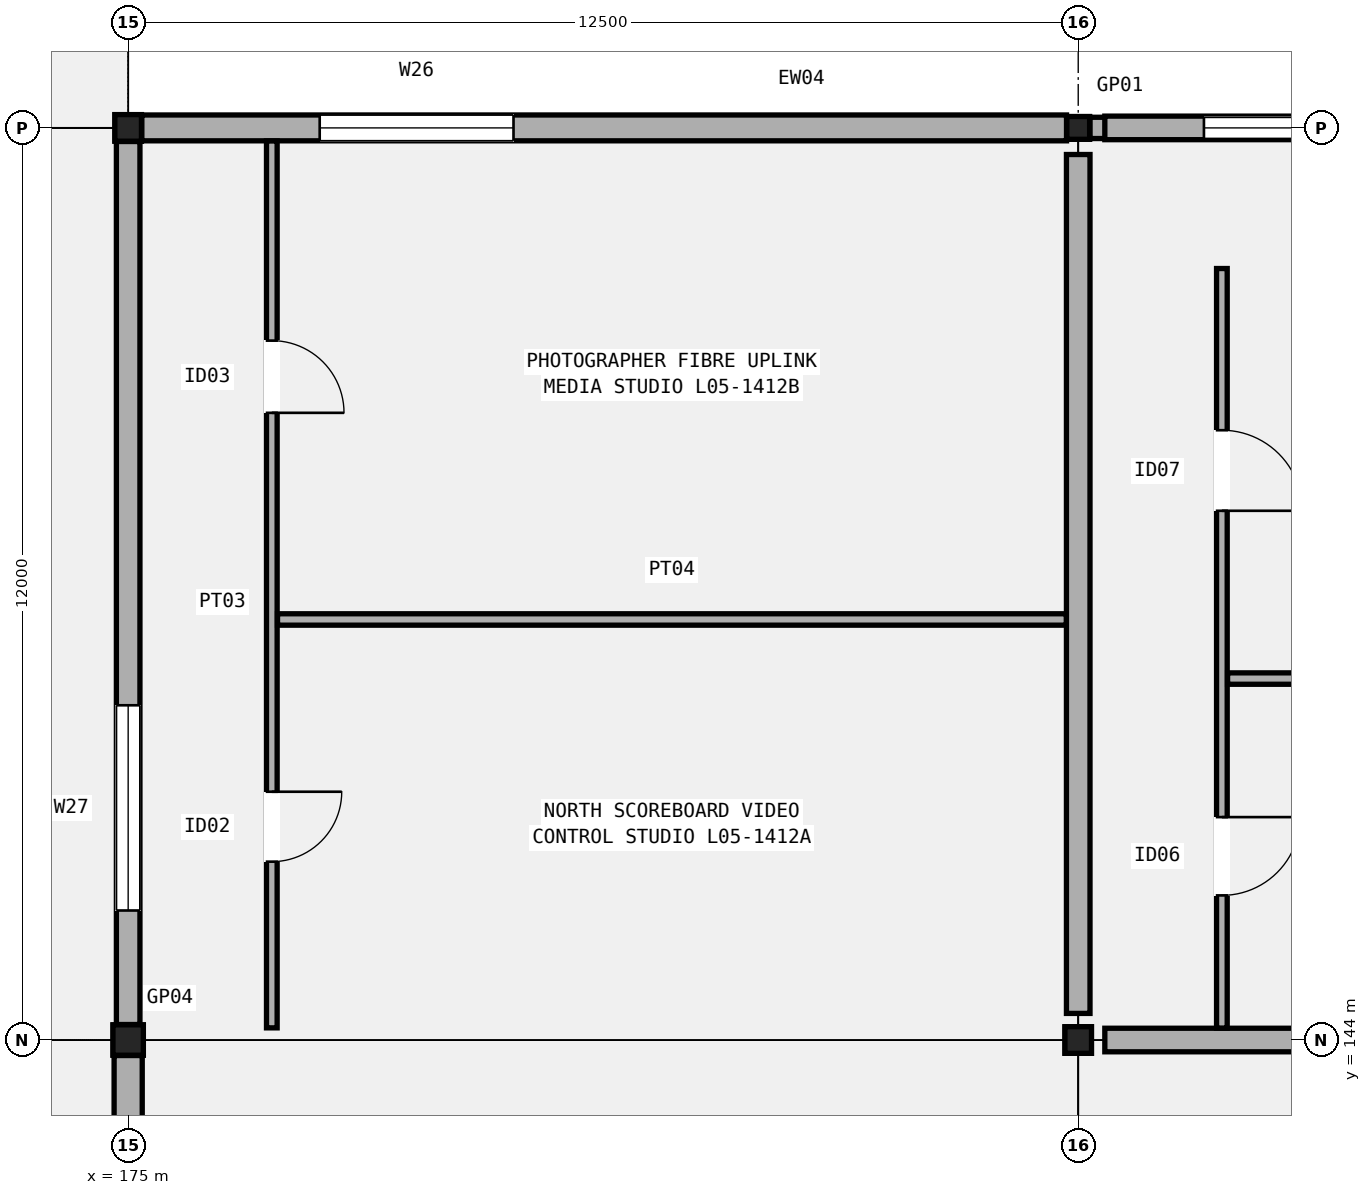
"""IFC4 building model, lengths in metres.
Left out: names, types, materials, properties, quantities, classifications, styles, units other than length and angle.
Written with IfcOpenShell. Run it as: python <this file> out.ifc"""

import sys

from ifc_helpers import new_model, si_unit, direction, frame, frame_2d, origin, origin_2d, place, context, subcontext, project, spatial, rectangle, hollow_rectangle, extrude, element, fill, save


model = new_model("IFC4")
c1 = context("Model", 3, precision=1e-05, world=origin(), true_north=direction((0.0, 1.0)))
c2 = subcontext(c1, "Body", "Model", "MODEL_VIEW")
j1 = project(units=[si_unit("LENGTHUNIT", "METRE"), si_unit("PLANEANGLEUNIT", "RADIAN")], contexts=[c1])
p1 = place(None, origin())
s1 = spatial("IfcSite", under=j1, at=p1, CompositionType="ELEMENT")
p2 = place(p1, origin())
s2 = spatial("IfcBuilding", under=s1, at=p2, CompositionType="ELEMENT")
p3 = place(p2, frame((0.0, 0.0, 25.8)))
s3 = spatial("IfcBuildingStorey", under=s2, at=p3, CompositionType="ELEMENT", Elevation=25.8)
p4 = place(p3, frame((175.0, 144.0, 0.0), z_axis=(0.0, 0.0, 1.0), x_axis=(1.0, 0.0, 0.0)))
e1 = element("IfcColumn", 1, at=p4, inside=s3, PredefinedType="COLUMN", context=c2, shape_type="SweptSolid", body=[
    extrude(hollow_rectangle(XDim=0.4, YDim=0.4, WallThickness=0.016, InnerFilletRadius=0.016, OuterFilletRadius=0.032, at=origin_2d()), origin(), (0.0, 0.0, 1.0), 5.4),
])
for number, where, z_axis, x_axis in (
    (2, (175.0, 156.0, 0.0), (0.0, 0.0, 1.0), (1.0, 0.0, 0.0)),
    (3, (187.5, 144.0, 0.0), (0.0, 0.0, 1.0), (1.0, 0.0, 0.0)),
):
    element("IfcColumn", number, at=place(p3, frame(where, z_axis=z_axis, x_axis=x_axis)), inside=s3, PredefinedType="COLUMN", context=c2, shape_type="SweptSolid", body=[
        extrude(hollow_rectangle(XDim=0.35, YDim=0.35, WallThickness=0.016, InnerFilletRadius=0.016, OuterFilletRadius=0.032, at=origin_2d()), origin(), (0.0, 0.0, 1.0), 5.4),
    ])
p5 = place(p3, frame((187.5, 156.0, 0.0), z_axis=(0.0, 0.0, 1.0), x_axis=(1.0, 0.0, 0.0)))
e4 = element("IfcColumn", 4, at=p5, inside=s3, PredefinedType="COLUMN", context=c2, shape_type="SweptSolid", body=[
    extrude(hollow_rectangle(XDim=0.3, YDim=0.3, WallThickness=0.012, InnerFilletRadius=0.012, OuterFilletRadius=0.024, at=origin_2d()), origin(), (0.0, 0.0, 1.0), 5.4),
])
p6 = place(p3, frame((175.0, 132.304, 0.0), z_axis=(0.0, 0.0, 1.0), x_axis=(0.0, 1.0, 0.0)))
e5 = element("IfcWall", 5, at=p6, inside=s3, PredefinedType="SOLIDWALL", context=c2, shape_type="SweptSolid", body=[
    extrude(rectangle(XDim=11.492, YDim=0.37, at=frame_2d((5.746, 0.0))), origin(), (0.0, 0.0, 1.0), 4.13),
])
p7 = place(p6, frame((1.5, 0.0, 0.95)))
e6 = element("IfcOpeningElement", 6, at=p7, cuts=e5, PredefinedType="OPENING", context=c2, shape_type="SweptSolid", body=[
    extrude(rectangle(XDim=2.4, YDim=2.45, at=frame_2d((1.2, 1.225))), frame((0.0, 0.195, 0.0), z_axis=(0.0, -1.0, 0.0), x_axis=(1.0, 0.0, 0.0)), (0.0, 0.0, 1.0), 0.39),
])
p8 = place(p3, frame((175.179, 156.0, 0.0), z_axis=(0.0, 0.0, 1.0), x_axis=(1.0, 0.0, 0.0)))
e7 = element("IfcWall", 7, at=p8, inside=s3, PredefinedType="SOLIDWALL", context=c2, shape_type="SweptSolid", body=[
    extrude(rectangle(XDim=12.167, YDim=0.34, at=frame_2d((6.083, 0.0))), origin(), (0.0, 0.0, 1.0), 4.34),
])
p9 = place(p8, frame((2.341, 0.0, 0.95)))
e8 = element("IfcOpeningElement", 8, at=p9, cuts=e7, PredefinedType="OPENING", context=c2, shape_type="SweptSolid", body=[
    extrude(rectangle(XDim=2.55, YDim=1.95, at=frame_2d((1.275, 0.975))), frame((0.0, 0.18, 0.0), z_axis=(0.0, -1.0, 0.0), x_axis=(1.0, 0.0, 0.0)), (0.0, 0.0, 1.0), 0.36),
])
p10 = place(p3, frame((175.0, 144.204, 0.0), z_axis=(0.0, 0.0, 1.0), x_axis=(0.0, 1.0, 0.0)))
e9 = element("IfcWall", 9, at=p10, inside=s3, PredefinedType="SOLIDWALL", context=c2, shape_type="SweptSolid", body=[
    extrude(rectangle(XDim=11.617, YDim=0.31, at=frame_2d((5.809, 0.0))), origin(), (0.0, 0.0, 1.0), 4.452),
])
p11 = place(p10, frame((1.5, 0.0, 0.95)))
e10 = element("IfcOpeningElement", 10, at=p11, cuts=e9, PredefinedType="OPENING", context=c2, shape_type="SweptSolid", body=[
    extrude(rectangle(XDim=2.7, YDim=1.75, at=frame_2d((1.35, 0.875))), frame((0.0, 0.165, 0.0), z_axis=(0.0, -1.0, 0.0), x_axis=(1.0, 0.0, 0.0)), (0.0, 0.0, 1.0), 0.33),
])
p12 = place(p3, frame((187.654, 156.0, 0.0), z_axis=(0.0, 0.0, 1.0), x_axis=(1.0, 0.0, 0.0)))
e11 = element("IfcWall", 11, at=p12, inside=s3, PredefinedType="SOLIDWALL", context=c2, shape_type="SweptSolid", body=[
    extrude(rectangle(XDim=12.217, YDim=0.28, at=frame_2d((6.108, 0.0))), origin(), (0.0, 0.0, 1.0), 4.44),
])
p13 = place(p12, frame((1.5, 0.0, 0.95)))
e12 = element("IfcOpeningElement", 12, at=p13, cuts=e11, PredefinedType="OPENING", context=c2, shape_type="SweptSolid", body=[
    extrude(rectangle(XDim=3.3, YDim=2.25, at=frame_2d((1.65, 1.125))), frame((0.0, 0.15, 0.0), z_axis=(0.0, -1.0, 0.0), x_axis=(1.0, 0.0, 0.0)), (0.0, 0.0, 1.0), 0.3),
])
p14 = place(p3, frame((187.85, 144.0, 5.4), z_axis=(0.0, 0.0, 1.0), x_axis=(1.0, 0.0, 0.0)))
e13 = element("IfcWall", 13, at=p14, inside=s3, PredefinedType="SOLIDWALL", context=c2, shape_type="SweptSolid", body=[
    extrude(rectangle(XDim=11.8, YDim=0.31, at=frame_2d((5.9, 0.0))), origin(), (0.0, 0.0, 1.0), 0.58),
])
p15 = place(p3, frame((187.85, 156.0, 5.4), z_axis=(0.0, 0.0, 1.0), x_axis=(1.0, 0.0, 0.0)))
e14 = element("IfcWall", 14, at=p15, inside=s3, PredefinedType="SOLIDWALL", context=c2, shape_type="SweptSolid", body=[
    extrude(rectangle(XDim=11.8, YDim=0.31, at=frame_2d((5.9, 0.0))), origin(), (0.0, 0.0, 1.0), 1.38),
])
p16 = place(p3, frame((187.5, 144.35, 5.4), z_axis=(0.0, 0.0, 1.0), x_axis=(0.0, 1.0, 0.0)))
e15 = element("IfcWall", 15, at=p16, inside=s3, PredefinedType="SOLIDWALL", context=c2, shape_type="SweptSolid", body=[
    extrude(rectangle(XDim=11.3, YDim=0.31, at=frame_2d((5.65, 0.0))), origin(), (0.0, 0.0, 1.0), 0.58),
])
p17 = place(p3, frame((176.89, 144.16, 0.0), z_axis=(0.0, 0.0, 1.0), x_axis=(0.0, 1.0, 0.0)))
e16 = element("IfcWall", 16, at=p17, inside=s3, PredefinedType="PARTITIONING", context=c2, shape_type="SweptSolid", body=[
    extrude(rectangle(XDim=11.668, YDim=0.14, at=frame_2d((5.834, 0.0))), origin(), (0.0, 0.0, 1.0), 4.35),
])
p18 = place(p17, frame((3.106, 0.0, 0.0), z_axis=(0.0, 0.0, 1.0), x_axis=(-1.0, 0.0, 0.0)))
e17 = element("IfcOpeningElement", 17, at=p18, cuts=e16, PredefinedType="OPENING", context=c2, shape_type="SweptSolid", body=[
    extrude(rectangle(XDim=0.92, YDim=2.1, at=frame_2d((0.46, 1.05))), frame((0.0, 0.08, 0.0), z_axis=(0.0, -1.0, 0.0), x_axis=(1.0, 0.0, 0.0)), (0.0, 0.0, 1.0), 0.16),
])
p19 = place(p17, frame((9.041, 0.0, 0.0), z_axis=(0.0, 0.0, 1.0), x_axis=(-1.0, 0.0, 0.0)))
e18 = element("IfcOpeningElement", 18, at=p19, cuts=e16, PredefinedType="OPENING", context=c2, shape_type="SweptSolid", body=[
    extrude(rectangle(XDim=0.95, YDim=2.12, at=frame_2d((0.475, 1.06))), frame((0.0, 0.08, 0.0), z_axis=(0.0, -1.0, 0.0), x_axis=(1.0, 0.0, 0.0)), (0.0, 0.0, 1.0), 0.16),
])
p20 = place(p3, frame((176.965, 149.533, 0.0), z_axis=(0.0, 0.0, 1.0), x_axis=(1.0, 0.0, 0.0)))
e19 = element("IfcWall", 19, at=p20, inside=s3, PredefinedType="PARTITIONING", context=c2, shape_type="SweptSolid", body=[
    extrude(rectangle(XDim=10.378, YDim=0.15, at=frame_2d((5.189, 0.0))), origin(), (0.0, 0.0, 1.0), 4.35),
])
p21 = place(p3, frame((189.39, 144.157, 0.0), z_axis=(0.0, 0.0, 1.0), x_axis=(0.0, 1.0, 0.0)))
e20 = element("IfcWall", 20, at=p21, inside=s3, PredefinedType="PARTITIONING", context=c2, shape_type="SweptSolid", body=[
    extrude(rectangle(XDim=9.993, YDim=0.14, at=frame_2d((4.997, 0.0))), origin(), (0.0, 0.0, 1.0), 4.35),
])
p22 = place(p21, frame((2.776, 0.0, 0.0), z_axis=(0.0, 0.0, 1.0), x_axis=(-1.0, 0.0, 0.0)))
e21 = element("IfcOpeningElement", 21, at=p22, cuts=e20, PredefinedType="OPENING", context=c2, shape_type="SweptSolid", body=[
    extrude(rectangle(XDim=1.03, YDim=2.12, at=frame_2d((0.515, 1.06))), frame((0.0, 0.08, 0.0), z_axis=(0.0, -1.0, 0.0), x_axis=(1.0, 0.0, 0.0)), (0.0, 0.0, 1.0), 0.16),
])
p23 = place(p21, frame((7.866, 0.0, 0.0), z_axis=(0.0, 0.0, 1.0), x_axis=(-1.0, 0.0, 0.0)))
e22 = element("IfcOpeningElement", 22, at=p23, cuts=e20, PredefinedType="OPENING", context=c2, shape_type="SweptSolid", body=[
    extrude(rectangle(XDim=1.06, YDim=2.15, at=frame_2d((0.53, 1.075))), frame((0.0, 0.08, 0.0), z_axis=(0.0, -1.0, 0.0), x_axis=(1.0, 0.0, 0.0)), (0.0, 0.0, 1.0), 0.16),
])
p24 = place(p3, frame((189.465, 148.755, 0.0), z_axis=(0.0, 0.0, 1.0), x_axis=(1.0, 0.0, 0.0)))
e23 = element("IfcWall", 23, at=p24, inside=s3, PredefinedType="PARTITIONING", context=c2, shape_type="SweptSolid", body=[
    extrude(rectangle(XDim=8.785, YDim=0.15, at=frame_2d((4.393, 0.0))), origin(), (0.0, 0.0, 1.0), 4.35),
])
p25 = place(p9, origin())
e24 = element("IfcWindow", 24, at=p25, inside=s3, PartitioningType="SINGLE_PANEL", PredefinedType="WINDOW", context=c2, shape_type="SweptSolid", body=[
    extrude(rectangle(XDim=2.55, YDim=1.95, at=frame_2d((1.275, 0.975))), frame((0.0, 0.03, 0.0), z_axis=(0.0, -1.0, 0.0), x_axis=(1.0, 0.0, 0.0)), (0.0, 0.0, 1.0), 0.06),
])
fill(e8, e24)
p26 = place(p11, origin())
e25 = element("IfcWindow", 25, at=p26, inside=s3, PartitioningType="SINGLE_PANEL", PredefinedType="WINDOW", context=c2, shape_type="SweptSolid", body=[
    extrude(rectangle(XDim=2.7, YDim=1.75, at=frame_2d((1.35, 0.875))), frame((0.0, 0.03, 0.0), z_axis=(0.0, -1.0, 0.0), x_axis=(1.0, 0.0, 0.0)), (0.0, 0.0, 1.0), 0.06),
])
fill(e10, e25)
p27 = place(p13, origin())
e26 = element("IfcWindow", 26, at=p27, inside=s3, PartitioningType="SINGLE_PANEL", PredefinedType="WINDOW", context=c2, shape_type="SweptSolid", body=[
    extrude(rectangle(XDim=3.3, YDim=2.25, at=frame_2d((1.65, 1.125))), frame((0.0, 0.03, 0.0), z_axis=(0.0, -1.0, 0.0), x_axis=(1.0, 0.0, 0.0)), (0.0, 0.0, 1.0), 0.06),
])
fill(e12, e26)
p28 = place(p18, origin())
e27 = element("IfcDoor", 27, at=p28, inside=s3, OperationType="SINGLE_SWING_LEFT", PredefinedType="DOOR", context=c2, shape_type="SweptSolid", body=[
    extrude(rectangle(XDim=0.92, YDim=2.1, at=frame_2d((0.46, 1.05))), frame((0.0, 0.025, 0.0), z_axis=(0.0, -1.0, 0.0), x_axis=(1.0, 0.0, 0.0)), (0.0, 0.0, 1.0), 0.05),
])
fill(e17, e27)
p29 = place(p19, origin())
e28 = element("IfcDoor", 28, at=p29, inside=s3, OperationType="SINGLE_SWING_RIGHT", PredefinedType="DOOR", context=c2, shape_type="SweptSolid", body=[
    extrude(rectangle(XDim=0.95, YDim=2.12, at=frame_2d((0.475, 1.06))), frame((0.0, 0.025, 0.0), z_axis=(0.0, -1.0, 0.0), x_axis=(1.0, 0.0, 0.0)), (0.0, 0.0, 1.0), 0.05),
])
fill(e18, e28)
p30 = place(p22, origin())
e29 = element("IfcDoor", 29, at=p30, inside=s3, OperationType="SINGLE_SWING_LEFT", PredefinedType="DOOR", context=c2, shape_type="SweptSolid", body=[
    extrude(rectangle(XDim=1.03, YDim=2.12, at=frame_2d((0.515, 1.06))), frame((0.0, 0.025, 0.0), z_axis=(0.0, -1.0, 0.0), x_axis=(1.0, 0.0, 0.0)), (0.0, 0.0, 1.0), 0.05),
])
fill(e21, e29)
p31 = place(p23, origin())
e30 = element("IfcDoor", 30, at=p31, inside=s3, OperationType="SINGLE_SWING_RIGHT", PredefinedType="DOOR", context=c2, shape_type="SweptSolid", body=[
    extrude(rectangle(XDim=1.06, YDim=2.15, at=frame_2d((0.53, 1.075))), frame((0.0, 0.025, 0.0), z_axis=(0.0, -1.0, 0.0), x_axis=(1.0, 0.0, 0.0)), (0.0, 0.0, 1.0), 0.05),
])
fill(e22, e30)
save(model, sys.argv[1])
